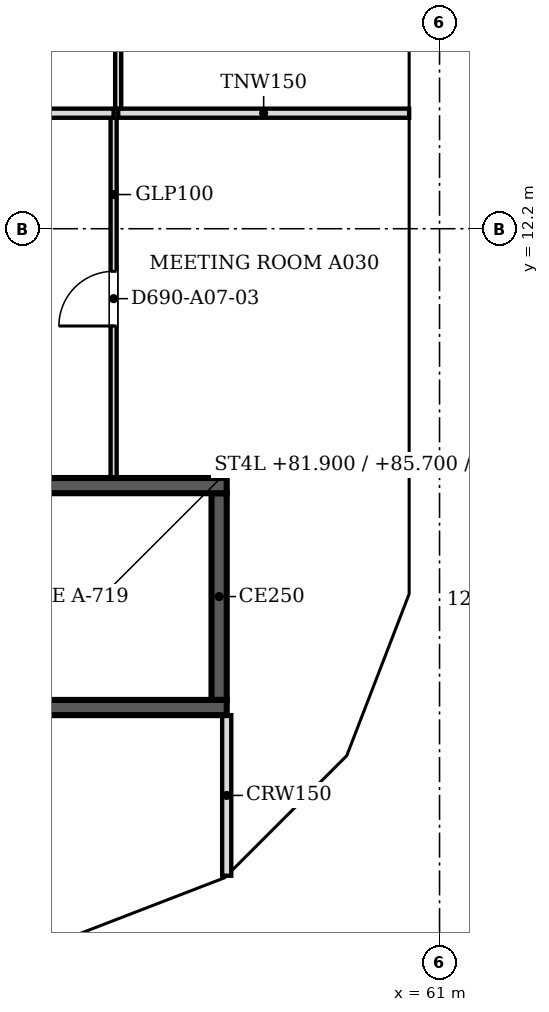
"""IFC4 building model, lengths in metres.
Left out: names, types, materials, properties, quantities, classifications, styles, units other than length and angle.
Written with IfcOpenShell. Run it as: python <this file> out.ifc"""

import sys

from ifc_helpers import new_model, si_unit, direction, frame, frame_2d, origin, place, context, subcontext, project, spatial, polyline, rectangle, outline, extrude, faceted_brep, source, transform, mapped, element, fill, save


model = new_model("IFC4")
c1 = context("Model", 3, precision=1e-05, world=origin(), true_north=direction((0.0, 1.0)))
c2 = subcontext(c1, "Body", "Model", "MODEL_VIEW")
j1 = project(units=[si_unit("LENGTHUNIT", "METRE"), si_unit("PLANEANGLEUNIT", "RADIAN")], contexts=[c1])
p1 = place(None, origin())
s1 = spatial("IfcSite", under=j1, at=p1, CompositionType="ELEMENT")
p2 = place(p1, origin())
s2 = spatial("IfcBuilding", under=s1, at=p2, CompositionType="ELEMENT")
p3 = place(p2, frame((0.0, 0.0, 80.0)))
s3 = spatial("IfcBuildingStorey", under=s2, at=p3, CompositionType="ELEMENT", Elevation=80.0)
m1 = source(origin(), c2, "Body", "Brep", [
    faceted_brep([(2.95, -0.25, 0.0), (3.003, -0.25, 0.068), (3.003, -0.25, 7.532), (2.95, -0.25, 7.6), (0.0, -0.25, 3.8), (0.047, 0.25, 3.86), (2.898, 0.25, 7.532), (2.898, 0.25, 0.068), (0.047, 0.25, 3.74), (2.95, 0.0, 0.0), (2.95, 0.0, 7.6), (0.0, 0.0, 3.8)], [[[0, 1, 2, 3, 4]], [[5, 6, 7, 8]], [[1, 0, 9]], [[10, 3, 2]], [[6, 5, 11, 4, 3, 10]], [[8, 7, 9, 0, 4, 11]], [[8, 11, 5]], [[1, 9, 7, 6, 10, 2]]]),
])
p4 = place(p3, frame((54.854, 0.25, -3.8), z_axis=(0.0, 0.0, 1.0), x_axis=(0.932970071518, 0.359953949349, 0.0)))
e1 = element("IfcWall", 1, at=p4, inside=s3, PredefinedType="SOLIDWALL", context=c2, shape_type="MappedRepresentation", body=[
    mapped(m1, transform((0.0, 0.0, 0.0), scale=1.0)),
])
m2 = source(origin(), c2, "Body", "SweptSolid", [
    extrude(outline(polyline([(2.75, 6.935), (0.316, 3.8), (2.75, 0.665), (2.75, 6.935)])), frame((0.0, 0.26, 0.0), z_axis=(0.0, -1.0, 0.0), x_axis=(1.0, 0.0, 0.0)), (0.0, 0.0, 1.0), 0.52),
])
p5 = place(p4, origin())
e2 = element("IfcOpeningElement", 2, at=p5, cuts=e1, PredefinedType="OPENING", context=c2, shape_type="MappedRepresentation", body=[
    mapped(m2, transform((0.0, 0.0, 0.0), scale=1.0)),
])
m3 = source(origin(), c2, "Body", "Brep", [
    faceted_brep([(0.053, -0.25, 0.0), (2.997, -0.25, 3.8), (0.053, -0.25, 7.6), (0.0, -0.25, 7.532), (0.0, -0.25, 0.068), (0.106, 0.25, 7.532), (2.944, 0.25, 3.868), (2.944, 0.25, 3.732), (0.106, 0.25, 0.068), (2.997, 0.0, 3.8), (0.053, 0.0, 0.0), (0.053, 0.0, 7.6)], [[[0, 1, 2, 3, 4]], [[5, 6, 7, 8]], [[8, 7, 9, 1, 0, 10]], [[6, 5, 11, 2, 1, 9]], [[3, 2, 11]], [[10, 0, 4]], [[8, 10, 4, 3, 11, 5]], [[9, 7, 6]]]),
])
p6 = place(p3, frame((57.569, 1.274, -3.8), z_axis=(0.0, 0.0, 1.0), x_axis=(0.707066050402, 0.707147509625, 0.0)))
e3 = element("IfcWall", 3, at=p6, inside=s3, PredefinedType="SOLIDWALL", context=c2, shape_type="MappedRepresentation", body=[
    mapped(m3, transform((0.0, 0.0, 0.0), scale=1.0)),
])
m4 = source(origin(), c2, "Body", "SweptSolid", [
    extrude(outline(polyline([(0.253, 0.666), (2.681, 3.8), (0.253, 6.934), (0.253, 0.666)])), frame((0.0, 0.26, 0.0), z_axis=(0.0, -1.0, 0.0), x_axis=(1.0, 0.0, 0.0)), (0.0, 0.0, 1.0), 0.52),
])
p7 = place(p6, origin())
e4 = element("IfcOpeningElement", 4, at=p7, cuts=e3, PredefinedType="OPENING", context=c2, shape_type="MappedRepresentation", body=[
    mapped(m4, transform((0.0, 0.0, 0.0), scale=1.0)),
])
m5 = source(origin(), c2, "Body", "Brep", [
    faceted_brep([(2.95, -0.25, 0.0), (2.997, -0.25, 0.059), (2.997, -0.25, 7.541), (2.95, -0.25, 7.6), (0.0, -0.25, 3.8), (0.053, 0.25, 3.868), (2.904, 0.25, 7.54), (2.904, 0.25, 0.06), (0.053, 0.25, 3.732), (2.95, 0.0, 0.0), (2.95, 0.0, 7.6), (0.0, 0.0, 3.8)], [[[0, 1, 2, 3, 4]], [[5, 6, 7, 8]], [[1, 0, 9]], [[10, 3, 2]], [[6, 5, 11, 4, 3, 10]], [[8, 7, 9, 0, 4, 11]], [[8, 11, 5]], [[1, 9, 7, 6, 10, 2]]]),
])
p8 = place(p3, frame((59.688, 3.394, -3.8), z_axis=(0.0, 0.0, 1.0), x_axis=(0.359972353723, 0.932962970624, 0.0)))
e5 = element("IfcWall", 5, at=p8, inside=s3, PredefinedType="SOLIDWALL", context=c2, shape_type="MappedRepresentation", body=[
    mapped(m5, transform((0.0, 0.0, 0.0), scale=1.0)),
])
p9 = place(p8, origin())
e6 = element("IfcOpeningElement", 6, at=p9, cuts=e5, PredefinedType="OPENING", context=c2, shape_type="MappedRepresentation", body=[
    mapped(m2, transform((0.0, 0.0, 0.0), scale=1.0)),
])
m6 = source(origin(), c2, "Body", "Brep", [
    faceted_brep([(0.047, -0.25, 0.0), (3.05, -0.25, 3.8), (0.047, -0.25, 7.6), (0.0, -0.25, 7.54), (0.0, -0.25, 0.06), (0.093, 0.25, 7.541), (3.05, 0.25, 3.8), (0.093, 0.25, 0.059), (0.047, 0.0, 0.0), (0.047, 0.0, 7.6)], [[[0, 1, 2, 3, 4]], [[5, 6, 7]], [[7, 6, 1, 0, 8]], [[6, 5, 9, 2, 1]], [[3, 2, 9]], [[8, 0, 4]], [[7, 8, 4, 3, 9, 5]]]),
])
p10 = place(p3, frame((60.75, 6.1, -3.8), z_axis=(0.0, 0.0, 1.0), x_axis=(0.0, 1.0, 0.0)))
e7 = element("IfcWall", 7, at=p10, inside=s3, PredefinedType="SOLIDWALL", context=c2, shape_type="MappedRepresentation", body=[
    mapped(m6, transform((0.0, 0.0, 0.0), scale=1.0)),
])
m7 = source(origin(), c2, "Body", "SweptSolid", [
    extrude(outline(polyline([(0.247, 0.656), (2.731, 3.8), (0.247, 6.944), (0.247, 0.656)])), frame((0.0, 0.26, 0.0), z_axis=(0.0, -1.0, 0.0), x_axis=(1.0, 0.0, 0.0)), (0.0, 0.0, 1.0), 0.52),
])
p11 = place(p10, origin())
e8 = element("IfcOpeningElement", 8, at=p11, cuts=e7, PredefinedType="OPENING", context=c2, shape_type="MappedRepresentation", body=[
    mapped(m7, transform((0.0, 0.0, 0.0), scale=1.0)),
])
m8 = source(origin(), c2, "Body", "SweptSolid", [
    extrude(outline(polyline([(3.05, 0.0), (6.1, 3.8), (3.05, 7.6), (0.0, 3.8), (3.05, 0.0)])), frame((0.0, 0.25, 0.0), z_axis=(0.0, -1.0, 0.0), x_axis=(1.0, 0.0, 0.0)), (0.0, 0.0, 1.0), 0.5),
])
p12 = place(p3, frame((60.75, 9.15, -3.8), z_axis=(0.0, 0.0, 1.0), x_axis=(0.0, 1.0, 0.0)))
e9 = element("IfcWall", 9, at=p12, inside=s3, PredefinedType="SOLIDWALL", context=c2, shape_type="MappedRepresentation", body=[
    mapped(m8, transform((0.0, 0.0, 0.0), scale=1.0)),
])
m9 = source(origin(), c2, "Body", "SweptSolid", [
    extrude(outline(polyline([(3.05, 0.399), (5.78, 3.8), (3.05, 7.201), (0.321, 3.8), (3.05, 0.399)])), frame((0.0, 0.26, 0.0), z_axis=(0.0, -1.0, 0.0), x_axis=(1.0, 0.0, 0.0)), (0.0, 0.0, 1.0), 0.52),
])
p13 = place(p12, origin())
e10 = element("IfcOpeningElement", 10, at=p13, cuts=e9, PredefinedType="OPENING", context=c2, shape_type="MappedRepresentation", body=[
    mapped(m9, transform((0.0, 0.0, 0.0), scale=1.0)),
])
p14 = place(p2, frame((0.0, 0.0, 83.8)))
s4 = spatial("IfcBuildingStorey", under=s2, at=p14, CompositionType="ELEMENT", Elevation=83.8)
m10 = source(origin(), c2, "Body", "Brep", [
    faceted_brep([(0.047, -0.25, 0.0), (2.997, -0.25, 3.8), (0.047, -0.25, 7.6), (0.0, -0.25, 7.541), (0.0, -0.25, 0.059), (0.093, 0.25, 7.54), (2.944, 0.25, 3.868), (2.944, 0.25, 3.732), (0.093, 0.25, 0.06), (2.997, 0.0, 3.8), (0.047, 0.0, 0.0), (0.047, 0.0, 7.6)], [[[0, 1, 2, 3, 4]], [[5, 6, 7, 8]], [[8, 7, 9, 1, 0, 10]], [[6, 5, 11, 2, 1, 9]], [[3, 2, 11]], [[10, 0, 4]], [[8, 10, 4, 3, 11, 5]], [[9, 7, 6]]]),
])
p15 = place(p14, frame((54.81, 0.233, -3.8), z_axis=(0.0, 0.0, 1.0), x_axis=(0.932990326376, 0.359901446078, 0.0)))
e11 = element("IfcWall", 11, at=p15, inside=s4, PredefinedType="SOLIDWALL", context=c2, shape_type="MappedRepresentation", body=[
    mapped(m10, transform((0.0, 0.0, 0.0), scale=1.0)),
])
m11 = source(origin(), c2, "Body", "SweptSolid", [
    extrude(outline(polyline([(0.247, 0.665), (2.681, 3.8), (0.247, 6.935), (0.247, 0.665)])), frame((0.0, 0.26, 0.0), z_axis=(0.0, -1.0, 0.0), x_axis=(1.0, 0.0, 0.0)), (0.0, 0.0, 1.0), 0.52),
])
p16 = place(p15, origin())
e12 = element("IfcOpeningElement", 12, at=p16, cuts=e11, PredefinedType="OPENING", context=c2, shape_type="MappedRepresentation", body=[
    mapped(m11, transform((0.0, 0.0, 0.0), scale=1.0)),
])
m12 = source(origin(), c2, "Body", "Brep", [
    faceted_brep([(2.944, -0.25, 0.0), (2.997, -0.25, 0.068), (2.997, -0.25, 7.532), (2.944, -0.25, 7.6), (0.0, -0.25, 3.8), (0.053, 0.25, 3.868), (2.891, 0.25, 7.532), (2.891, 0.25, 0.068), (0.053, 0.25, 3.732), (2.944, 0.0, 0.0), (2.944, 0.0, 7.6), (0.0, 0.0, 3.8)], [[[0, 1, 2, 3, 4]], [[5, 6, 7, 8]], [[1, 0, 9]], [[10, 3, 2]], [[6, 5, 11, 4, 3, 10]], [[8, 7, 9, 0, 4, 11]], [[8, 11, 5]], [[1, 9, 7, 6, 10, 2]]]),
])
p17 = place(p14, frame((57.606, 1.312, -3.8), z_axis=(0.0, 0.0, 1.0), x_axis=(0.707147509625, 0.707066050402, 0.0)))
e13 = element("IfcWall", 13, at=p17, inside=s4, PredefinedType="SOLIDWALL", context=c2, shape_type="MappedRepresentation", body=[
    mapped(m12, transform((0.0, 0.0, 0.0), scale=1.0)),
])
m13 = source(origin(), c2, "Body", "SweptSolid", [
    extrude(outline(polyline([(2.744, 6.934), (0.316, 3.8), (2.744, 0.666), (2.744, 6.934)])), frame((0.0, 0.26, 0.0), z_axis=(0.0, -1.0, 0.0), x_axis=(1.0, 0.0, 0.0)), (0.0, 0.0, 1.0), 0.52),
])
p18 = place(p17, origin())
e14 = element("IfcOpeningElement", 14, at=p18, cuts=e13, PredefinedType="OPENING", context=c2, shape_type="MappedRepresentation", body=[
    mapped(m13, transform((0.0, 0.0, 0.0), scale=1.0)),
])
m14 = source(origin(), c2, "Body", "Brep", [
    faceted_brep([(0.053, -0.25, 0.0), (3.003, -0.25, 3.8), (0.053, -0.25, 7.6), (0.0, -0.25, 7.532), (0.0, -0.25, 0.068), (0.106, 0.25, 7.532), (2.957, 0.25, 3.86), (2.957, 0.25, 3.74), (0.106, 0.25, 0.068), (3.003, 0.0, 3.8), (0.053, 0.0, 0.0), (0.053, 0.0, 7.6)], [[[0, 1, 2, 3, 4]], [[5, 6, 7, 8]], [[8, 7, 9, 1, 0, 10]], [[6, 5, 11, 2, 1, 9]], [[3, 2, 11]], [[10, 0, 4]], [[8, 10, 4, 3, 11, 5]], [[9, 7, 6]]]),
])
p19 = place(p14, frame((59.669, 3.344, -3.8), z_axis=(0.0, 0.0, 1.0), x_axis=(0.35992665181, 0.932980602862, 0.0)))
e15 = element("IfcWall", 15, at=p19, inside=s4, PredefinedType="SOLIDWALL", context=c2, shape_type="MappedRepresentation", body=[
    mapped(m14, transform((0.0, 0.0, 0.0), scale=1.0)),
])
m15 = source(origin(), c2, "Body", "SweptSolid", [
    extrude(outline(polyline([(0.253, 0.665), (2.687, 3.8), (0.253, 6.935), (0.253, 0.665)])), frame((0.0, 0.26, 0.0), z_axis=(0.0, -1.0, 0.0), x_axis=(1.0, 0.0, 0.0)), (0.0, 0.0, 1.0), 0.52),
])
p20 = place(p19, origin())
e16 = element("IfcOpeningElement", 16, at=p20, cuts=e15, PredefinedType="OPENING", context=c2, shape_type="MappedRepresentation", body=[
    mapped(m15, transform((0.0, 0.0, 0.0), scale=1.0)),
])
m16 = source(origin(), c2, "Body", "Brep", [
    faceted_brep([(3.003, -0.25, 0.0), (6.053, -0.25, 3.8), (3.003, -0.25, 7.6), (0.0, -0.25, 3.8), (0.047, 0.25, 3.859), (3.003, 0.25, 7.6), (6.053, 0.25, 3.8), (3.003, 0.25, 0.0), (0.047, 0.25, 3.741), (0.0, 0.0, 3.8)], [[[0, 1, 2, 3]], [[4, 5, 6, 7, 8]], [[7, 6, 1, 0]], [[6, 5, 2, 1]], [[5, 4, 9, 3, 2]], [[8, 7, 0, 3, 9]], [[8, 9, 4]]]),
])
p21 = place(p14, frame((60.75, 6.146, -3.8), z_axis=(0.0, 0.0, 1.0), x_axis=(0.0, 1.0, 0.0)))
e17 = element("IfcWall", 17, at=p21, inside=s4, PredefinedType="SOLIDWALL", context=c2, shape_type="MappedRepresentation", body=[
    mapped(m16, transform((0.0, 0.0, 0.0), scale=1.0)),
])
m17 = source(origin(), c2, "Body", "SweptSolid", [
    extrude(outline(polyline([(3.005, 0.401), (5.733, 3.8), (3.005, 7.199), (0.319, 3.8), (3.005, 0.401)])), frame((0.0, 0.26, 0.0), z_axis=(0.0, -1.0, 0.0), x_axis=(1.0, 0.0, 0.0)), (0.0, 0.0, 1.0), 0.52),
])
p22 = place(p21, origin())
e18 = element("IfcOpeningElement", 18, at=p22, cuts=e17, PredefinedType="OPENING", context=c2, shape_type="MappedRepresentation", body=[
    mapped(m17, transform((0.0, 0.0, 0.0), scale=1.0)),
])
p23 = place(p14, frame((60.75, 12.2, -3.8), z_axis=(0.0, 0.0, 1.0), x_axis=(0.0, 1.0, 0.0)))
e19 = element("IfcWall", 19, at=p23, inside=s4, PredefinedType="SOLIDWALL", context=c2, shape_type="MappedRepresentation", body=[
    mapped(m8, transform((0.0, 0.0, 0.0), scale=1.0)),
])
p24 = place(p23, origin())
e20 = element("IfcOpeningElement", 20, at=p24, cuts=e19, PredefinedType="OPENING", context=c2, shape_type="MappedRepresentation", body=[
    mapped(m9, transform((0.0, 0.0, 0.0), scale=1.0)),
])
p25 = place(p3, frame((57.5, 4.325, 0.0), z_axis=(0.0, 0.0, 1.0), x_axis=(-1.0, 0.0, 0.0)))
e21 = element("IfcWall", 21, at=p25, inside=s3, PredefinedType="SOLIDWALL", context=c2, shape_type="SweptSolid", body=[
    extrude(rectangle(XDim=8.5, YDim=0.25, at=frame_2d((4.25, 0.0))), origin(), (0.0, 0.0, 1.0), 3.8),
])
m18 = source(origin(), c2, "Body", "SweptSolid", [
    extrude(rectangle(XDim=1.2, YDim=2.1, at=frame_2d((0.6, 1.05))), frame((0.0, 0.135, 0.0), z_axis=(0.0, -1.0, 0.0), x_axis=(1.0, 0.0, 0.0)), (0.0, 0.0, 1.0), 0.27),
])
p26 = place(p25, frame((6.9, 0.0, 0.0)))
e22 = element("IfcOpeningElement", 22, at=p26, cuts=e21, PredefinedType="OPENING", context=c2, shape_type="MappedRepresentation", body=[
    mapped(m18, transform((0.0, 0.0, 0.0), scale=1.0)),
])
p27 = place(p3, frame((49.0, 7.975, 0.0), z_axis=(0.0, 0.0, 1.0), x_axis=(1.0, 0.0, 0.0)))
e23 = element("IfcWall", 23, at=p27, inside=s3, PredefinedType="SOLIDWALL", context=c2, shape_type="SweptSolid", body=[
    extrude(rectangle(XDim=8.5, YDim=0.25, at=frame_2d((4.25, 0.0))), origin(), (0.0, 0.0, 1.0), 3.8),
])
p28 = place(p3, frame((57.375, 7.85, 0.0), z_axis=(0.0, 0.0, 1.0), x_axis=(0.0, -1.0, 0.0)))
e24 = element("IfcWall", 24, at=p28, inside=s3, PredefinedType="SOLIDWALL", context=c2, shape_type="SweptSolid", body=[
    extrude(rectangle(XDim=3.4, YDim=0.25, at=frame_2d((1.7, 0.0))), origin(), (0.0, 0.0, 1.0), 3.8),
])
p29 = place(p3, frame((57.5, 1.559, 0.0), z_axis=(0.0, 0.0, 1.0), x_axis=(0.0, 1.0, 0.0)))
e25 = element("IfcWall", 25, at=p29, inside=s3, PredefinedType="PARTITIONING", context=c2, shape_type="SweptSolid", body=[
    extrude(rectangle(XDim=2.641, YDim=0.15, at=frame_2d((1.32, 0.0))), origin(), (0.0, 0.0, 1.0), 3.067),
])
p30 = place(p3, frame((55.64, 14.024, 0.0), z_axis=(0.0, 0.0, 1.0), x_axis=(0.0, -1.0, 0.0)))
e26 = element("IfcWall", 26, at=p30, inside=s3, PredefinedType="PARTITIONING", context=c2, shape_type="SweptSolid", body=[
    extrude(rectangle(XDim=5.924, YDim=0.1, at=frame_2d((2.962, 0.0))), origin(), (0.0, 0.0, 1.0), 3.067),
])
m19 = source(origin(), c2, "Body", "SweptSolid", [
    extrude(rectangle(XDim=0.9, YDim=2.1, at=frame_2d((0.45, 1.05))), frame((0.0, 0.06, 0.0), z_axis=(0.0, -1.0, 0.0), x_axis=(1.0, 0.0, 0.0)), (0.0, 0.0, 1.0), 0.12),
])
p31 = place(p30, frame((2.524, 0.0, 0.0)))
e27 = element("IfcOpeningElement", 27, at=p31, cuts=e26, PredefinedType="OPENING", context=c2, shape_type="MappedRepresentation", body=[
    mapped(m19, transform((0.0, 0.0, 0.0), scale=1.0)),
])
p32 = place(p3, frame((46.476, 14.1, 0.0), z_axis=(0.0, 0.0, 1.0), x_axis=(1.0, 0.0, 0.0)))
e28 = element("IfcWall", 28, at=p32, inside=s3, PredefinedType="PARTITIONING", context=c2, shape_type="SweptSolid", body=[
    extrude(rectangle(XDim=9.164, YDim=0.15, at=frame_2d((4.582, 0.0))), origin(), (0.0, 0.0, 1.0), 3.067),
])
p33 = place(p3, frame((55.715, 14.1, 0.0), z_axis=(0.0, 0.0, 1.0), x_axis=(1.0, 0.0, 0.0)))
e29 = element("IfcWall", 29, at=p33, inside=s3, PredefinedType="PARTITIONING", context=c2, shape_type="SweptSolid", body=[
    extrude(rectangle(XDim=4.785, YDim=0.15, at=frame_2d((2.393, 0.0))), origin(), (0.0, 0.0, 1.0), 3.067),
])
p34 = place(p3, frame((55.715, 21.924, 0.0), z_axis=(0.0, 0.0, 1.0), x_axis=(0.0, -1.0, 0.0)))
e30 = element("IfcWall", 30, at=p34, inside=s3, PredefinedType="PARTITIONING", context=c2, shape_type="SweptSolid", body=[
    extrude(rectangle(XDim=7.748, YDim=0.1, at=frame_2d((3.874, 0.0))), origin(), (0.0, 0.0, 1.0), 3.067),
])
p35 = place(p34, frame((3.448, 0.0, 0.0)))
e31 = element("IfcOpeningElement", 31, at=p35, cuts=e30, PredefinedType="OPENING", context=c2, shape_type="MappedRepresentation", body=[
    mapped(m19, transform((0.0, 0.0, 0.0), scale=1.0)),
])
m20 = source(origin(), c2, "Body", "SweptSolid", [
    extrude(rectangle(XDim=0.9, YDim=2.1, at=frame_2d((0.45, 1.05))), frame((0.0, 0.025, 0.0), z_axis=(0.0, -1.0, 0.0), x_axis=(1.0, 0.0, 0.0)), (0.0, 0.0, 1.0), 0.05),
])
p36 = place(p31, origin())
e32 = element("IfcDoor", 32, at=p36, inside=s3, OperationType="SINGLE_SWING_RIGHT", PredefinedType="DOOR", context=c2, shape_type="MappedRepresentation", body=[
    mapped(m20, transform((0.0, 0.0, 0.0), scale=1.0)),
])
fill(e27, e32)
save(model, sys.argv[1])
